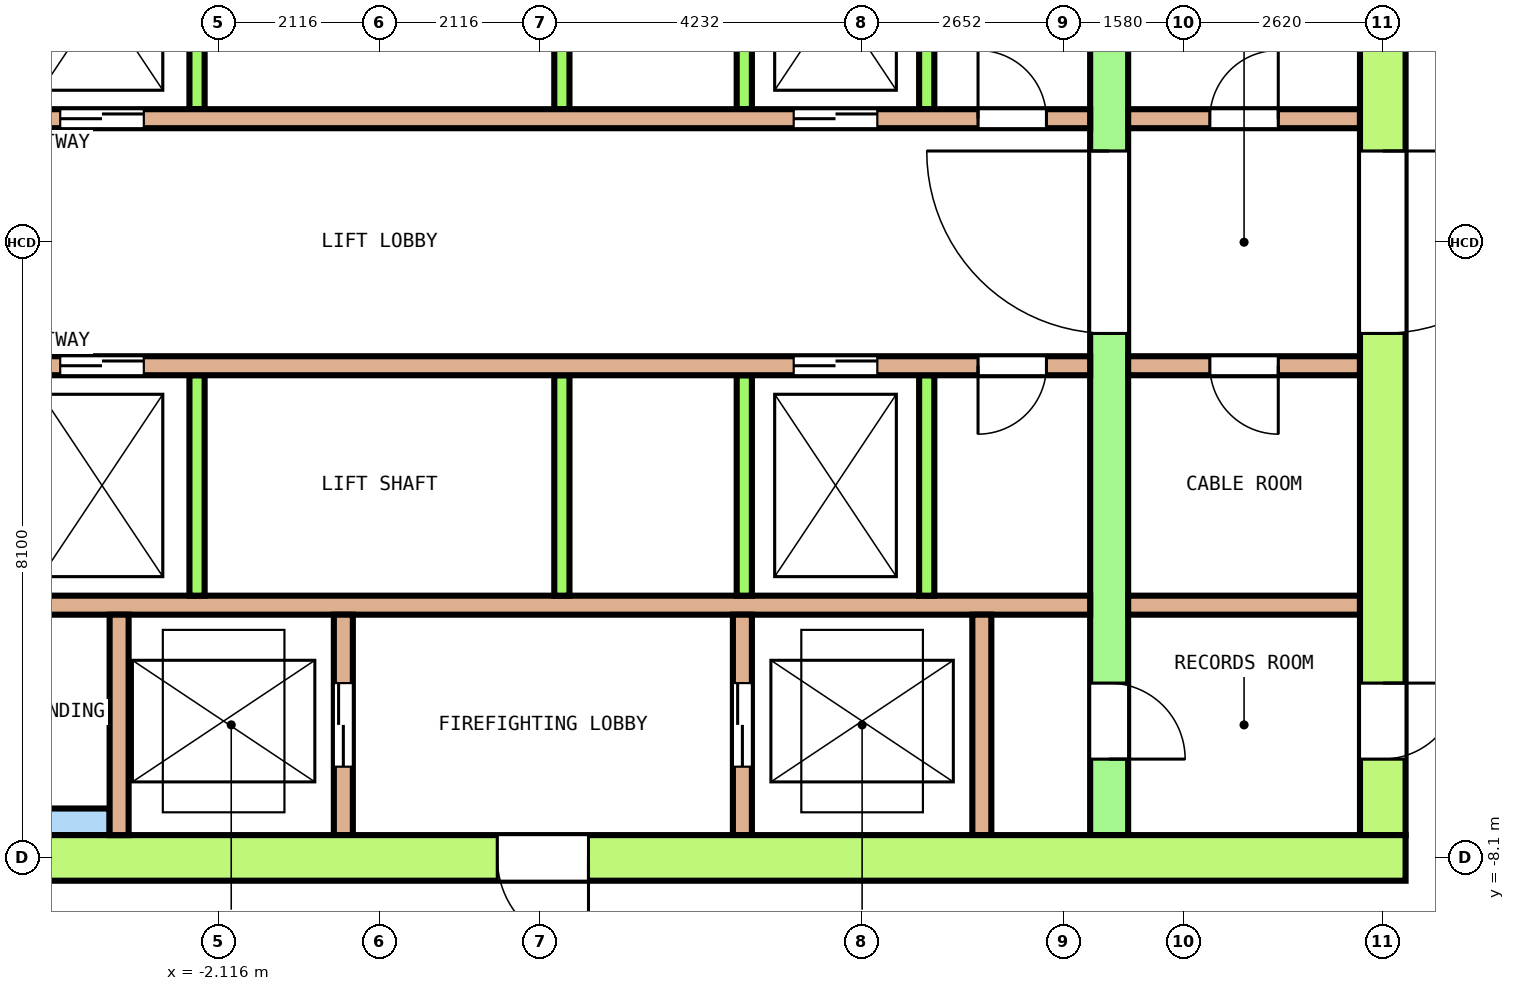
"""IFC4 building model, lengths in metres.
Left out: names, types, materials, properties, quantities, classifications, styles, units other than length and angle.
Written with IfcOpenShell. Run it as: python <this file> out.ifc"""

import sys

from ifc_helpers import new_model, si_unit, direction, frame, frame_2d, origin, place, context, subcontext, project, spatial, rectangle, extrude, element, fill, save


model = new_model("IFC4")
c1 = context("Model", 3, precision=1e-05, world=origin(), true_north=direction((0.0, 1.0)))
c2 = subcontext(c1, "Body", "Model", "MODEL_VIEW")
j1 = project(units=[si_unit("LENGTHUNIT", "METRE"), si_unit("PLANEANGLEUNIT", "RADIAN")], contexts=[c1])
p1 = place(None, origin())
s1 = spatial("IfcSite", under=j1, at=p1, CompositionType="ELEMENT")
p2 = place(p1, origin())
s2 = spatial("IfcBuilding", under=s1, at=p2, CompositionType="ELEMENT")
p3 = place(p2, frame((0.0, 0.0, 215.4)))
s3 = spatial("IfcBuildingStorey", under=s2, at=p3, CompositionType="ELEMENT", Elevation=215.4)
p4 = place(p3, frame((-13.5, -8.1, 0.0), z_axis=(0.0, 0.0, 1.0), x_axis=(1.0, 0.0, 0.0)))
e1 = element("IfcWall", 1, at=p4, inside=s3, PredefinedType="SHEAR", context=c2, shape_type="SweptSolid", body=[
    extrude(rectangle(XDim=27.0, YDim=0.6, at=frame_2d((13.5, 0.0))), origin(), (0.0, 0.0, 1.0), 3.7),
])
p5 = place(p4, frame((15.05, 0.0, 0.0)))
e2 = element("IfcOpeningElement", 2, at=p5, cuts=e1, PredefinedType="OPENING", context=c2, shape_type="SweptSolid", body=[
    extrude(rectangle(XDim=1.2, YDim=2.1, at=frame_2d((0.6, 1.05))), frame((0.0, 0.31, 0.0), z_axis=(0.0, -1.0, 0.0), x_axis=(1.0, 0.0, 0.0)), (0.0, 0.0, 1.0), 0.62),
])
p6 = place(p3, frame((13.2, -7.8, 0.0), z_axis=(0.0, 0.0, 1.0), x_axis=(0.0, 1.0, 0.0)))
e3 = element("IfcWall", 3, at=p6, inside=s3, PredefinedType="SHEAR", context=c2, shape_type="SweptSolid", body=[
    extrude(rectangle(XDim=15.6, YDim=0.6, at=frame_2d((7.8, 0.0))), origin(), (0.0, 0.0, 1.0), 3.7),
])
p7 = place(p6, frame((6.6, 0.0, 0.0)))
e4 = element("IfcOpeningElement", 4, at=p7, cuts=e3, PredefinedType="OPENING", context=c2, shape_type="SweptSolid", body=[
    extrude(rectangle(XDim=2.4, YDim=2.1, at=frame_2d((1.2, 1.05))), frame((0.0, 0.31, 0.0), z_axis=(0.0, -1.0, 0.0), x_axis=(1.0, 0.0, 0.0)), (0.0, 0.0, 1.0), 0.62),
])
p8 = place(p6, frame((13.5, 0.0, 0.0)))
e5 = element("IfcOpeningElement", 5, at=p8, cuts=e3, PredefinedType="OPENING", context=c2, shape_type="SweptSolid", body=[
    extrude(rectangle(XDim=1.2, YDim=2.1, at=frame_2d((0.6, 1.05))), frame((0.0, 0.31, 0.0), z_axis=(0.0, -1.0, 0.0), x_axis=(1.0, 0.0, 0.0)), (0.0, 0.0, 1.0), 0.62),
])
p9 = place(p6, frame((1.0, 0.0, 0.0)))
e6 = element("IfcOpeningElement", 6, at=p9, cuts=e3, PredefinedType="OPENING", context=c2, shape_type="SweptSolid", body=[
    extrude(rectangle(XDim=1.0, YDim=2.1, at=frame_2d((0.5, 1.05))), frame((0.0, 0.31, 0.0), z_axis=(0.0, -1.0, 0.0), x_axis=(1.0, 0.0, 0.0)), (0.0, 0.0, 1.0), 0.62),
])
p10 = place(p3, frame((9.6, -7.8, 0.0), z_axis=(0.0, 0.0, 1.0), x_axis=(0.0, 1.0, 0.0)))
e7 = element("IfcWall", 7, at=p10, inside=s3, PredefinedType="SHEAR", context=c2, shape_type="SweptSolid", body=[
    extrude(rectangle(XDim=15.6, YDim=0.5, at=frame_2d((7.8, 0.0))), origin(), (0.0, 0.0, 1.0), 3.7),
])
p11 = place(p10, frame((6.6, 0.0, 0.0)))
e8 = element("IfcOpeningElement", 8, at=p11, cuts=e7, PredefinedType="OPENING", context=c2, shape_type="SweptSolid", body=[
    extrude(rectangle(XDim=2.4, YDim=2.1, at=frame_2d((1.2, 1.05))), frame((0.0, 0.26, 0.0), z_axis=(0.0, -1.0, 0.0), x_axis=(1.0, 0.0, 0.0)), (0.0, 0.0, 1.0), 0.52),
])
p12 = place(p10, frame((13.5, 0.0, 0.0)))
e9 = element("IfcOpeningElement", 9, at=p12, cuts=e7, PredefinedType="OPENING", context=c2, shape_type="SweptSolid", body=[
    extrude(rectangle(XDim=1.2, YDim=2.1, at=frame_2d((0.6, 1.05))), frame((0.0, 0.26, 0.0), z_axis=(0.0, -1.0, 0.0), x_axis=(1.0, 0.0, 0.0)), (0.0, 0.0, 1.0), 0.52),
])
p13 = place(p10, frame((1.0, 0.0, 0.0)))
e10 = element("IfcOpeningElement", 10, at=p13, cuts=e7, PredefinedType="OPENING", context=c2, shape_type="SweptSolid", body=[
    extrude(rectangle(XDim=1.0, YDim=2.1, at=frame_2d((0.5, 1.05))), frame((0.0, 0.26, 0.0), z_axis=(0.0, -1.0, 0.0), x_axis=(1.0, 0.0, 0.0)), (0.0, 0.0, 1.0), 0.52),
])
p14 = place(p3, frame((-9.35, 1.625, 0.0), z_axis=(0.0, 0.0, 1.0), x_axis=(1.0, 0.0, 0.0)))
e11 = element("IfcWall", 11, at=p14, inside=s3, PredefinedType="SOLIDWALL", context=c2, shape_type="SweptSolid", body=[
    extrude(rectangle(XDim=18.7, YDim=0.25, at=frame_2d((9.35, 0.0))), origin(), (0.0, 0.0, 1.0), 3.7),
])
p15 = place(p14, frame((2.85, 0.0, 0.0)))
e12 = element("IfcOpeningElement", 12, at=p15, cuts=e11, PredefinedType="OPENING", context=c2, shape_type="SweptSolid", body=[
    extrude(rectangle(XDim=1.1, YDim=2.1, at=frame_2d((0.55, 1.05))), frame((0.0, 0.135, 0.0), z_axis=(0.0, -1.0, 0.0), x_axis=(1.0, 0.0, 0.0)), (0.0, 0.0, 1.0), 0.27),
])
p16 = place(p14, frame((5.15, 0.0, 0.0)))
e13 = element("IfcOpeningElement", 13, at=p16, cuts=e11, PredefinedType="OPENING", context=c2, shape_type="SweptSolid", body=[
    extrude(rectangle(XDim=1.1, YDim=2.1, at=frame_2d((0.55, 1.05))), frame((0.0, 0.135, 0.0), z_axis=(0.0, -1.0, 0.0), x_axis=(1.0, 0.0, 0.0)), (0.0, 0.0, 1.0), 0.27),
])
p17 = place(p14, frame((14.8, 0.0, 0.0)))
e14 = element("IfcOpeningElement", 14, at=p17, cuts=e11, PredefinedType="OPENING", context=c2, shape_type="SweptSolid", body=[
    extrude(rectangle(XDim=1.1, YDim=2.1, at=frame_2d((0.55, 1.05))), frame((0.0, 0.135, 0.0), z_axis=(0.0, -1.0, 0.0), x_axis=(1.0, 0.0, 0.0)), (0.0, 0.0, 1.0), 0.27),
])
p18 = place(p14, frame((0.575, 0.0, 0.0)))
e15 = element("IfcOpeningElement", 15, at=p18, cuts=e11, PredefinedType="OPENING", context=c2, shape_type="SweptSolid", body=[
    extrude(rectangle(XDim=0.9, YDim=2.1, at=frame_2d((0.45, 1.05))), frame((0.0, 0.135, 0.0), z_axis=(0.0, -1.0, 0.0), x_axis=(1.0, 0.0, 0.0)), (0.0, 0.0, 1.0), 0.27),
])
p19 = place(p14, frame((17.225, 0.0, 0.0)))
e16 = element("IfcOpeningElement", 16, at=p19, cuts=e11, PredefinedType="OPENING", context=c2, shape_type="SweptSolid", body=[
    extrude(rectangle(XDim=0.9, YDim=2.1, at=frame_2d((0.45, 1.05))), frame((0.0, 0.135, 0.0), z_axis=(0.0, -1.0, 0.0), x_axis=(1.0, 0.0, 0.0)), (0.0, 0.0, 1.0), 0.27),
])
p20 = place(p3, frame((9.85, 1.625, 0.0), z_axis=(0.0, 0.0, 1.0), x_axis=(1.0, 0.0, 0.0)))
e17 = element("IfcWall", 17, at=p20, inside=s3, PredefinedType="SOLIDWALL", context=c2, shape_type="SweptSolid", body=[
    extrude(rectangle(XDim=3.05, YDim=0.25, at=frame_2d((1.525, 0.0))), origin(), (0.0, 0.0, 1.0), 3.7),
])
p21 = place(p20, frame((1.075, 0.0, 0.0)))
e18 = element("IfcOpeningElement", 18, at=p21, cuts=e17, PredefinedType="OPENING", context=c2, shape_type="SweptSolid", body=[
    extrude(rectangle(XDim=0.9, YDim=2.1, at=frame_2d((0.45, 1.05))), frame((0.0, 0.135, 0.0), z_axis=(0.0, -1.0, 0.0), x_axis=(1.0, 0.0, 0.0)), (0.0, 0.0, 1.0), 0.27),
])
for number, where, z_axis, x_axis in (
    (19, (-2.4, 1.75, 0.0), (0.0, 0.0, 1.0), (0.0, 1.0, 0.0)),
    (20, (2.4, 1.75, 0.0), (0.0, 0.0, 1.0), (0.0, 1.0, 0.0)),
    (21, (4.8, 1.75, 0.0), (0.0, 0.0, 1.0), (0.0, 1.0, 0.0)),
    (22, (7.2, 1.75, 0.0), (0.0, 0.0, 1.0), (0.0, 1.0, 0.0)),
):
    element("IfcWall", number, at=place(p3, frame(where, z_axis=z_axis, x_axis=x_axis)), inside=s3, PredefinedType="SOLIDWALL", context=c2, shape_type="SweptSolid", body=[
        extrude(rectangle(XDim=2.9, YDim=0.2, at=frame_2d((1.45, 0.0))), origin(), (0.0, 0.0, 1.0), 3.7),
    ])
p22 = place(p3, frame((-9.35, -1.625, 0.0), z_axis=(0.0, 0.0, 1.0), x_axis=(1.0, 0.0, 0.0)))
e23 = element("IfcWall", 23, at=p22, inside=s3, PredefinedType="SOLIDWALL", context=c2, shape_type="SweptSolid", body=[
    extrude(rectangle(XDim=18.7, YDim=0.25, at=frame_2d((9.35, 0.0))), origin(), (0.0, 0.0, 1.0), 3.7),
])
p23 = place(p22, frame((2.85, 0.0, 0.0)))
e24 = element("IfcOpeningElement", 24, at=p23, cuts=e23, PredefinedType="OPENING", context=c2, shape_type="SweptSolid", body=[
    extrude(rectangle(XDim=1.1, YDim=2.1, at=frame_2d((0.55, 1.05))), frame((0.0, 0.135, 0.0), z_axis=(0.0, -1.0, 0.0), x_axis=(1.0, 0.0, 0.0)), (0.0, 0.0, 1.0), 0.27),
])
p24 = place(p22, frame((5.15, 0.0, 0.0)))
e25 = element("IfcOpeningElement", 25, at=p24, cuts=e23, PredefinedType="OPENING", context=c2, shape_type="SweptSolid", body=[
    extrude(rectangle(XDim=1.1, YDim=2.1, at=frame_2d((0.55, 1.05))), frame((0.0, 0.135, 0.0), z_axis=(0.0, -1.0, 0.0), x_axis=(1.0, 0.0, 0.0)), (0.0, 0.0, 1.0), 0.27),
])
p25 = place(p22, frame((14.8, 0.0, 0.0)))
e26 = element("IfcOpeningElement", 26, at=p25, cuts=e23, PredefinedType="OPENING", context=c2, shape_type="SweptSolid", body=[
    extrude(rectangle(XDim=1.1, YDim=2.1, at=frame_2d((0.55, 1.05))), frame((0.0, 0.135, 0.0), z_axis=(0.0, -1.0, 0.0), x_axis=(1.0, 0.0, 0.0)), (0.0, 0.0, 1.0), 0.27),
])
p26 = place(p22, frame((0.575, 0.0, 0.0)))
e27 = element("IfcOpeningElement", 27, at=p26, cuts=e23, PredefinedType="OPENING", context=c2, shape_type="SweptSolid", body=[
    extrude(rectangle(XDim=0.9, YDim=2.1, at=frame_2d((0.45, 1.05))), frame((0.0, 0.135, 0.0), z_axis=(0.0, -1.0, 0.0), x_axis=(1.0, 0.0, 0.0)), (0.0, 0.0, 1.0), 0.27),
])
p27 = place(p22, frame((17.225, 0.0, 0.0)))
e28 = element("IfcOpeningElement", 28, at=p27, cuts=e23, PredefinedType="OPENING", context=c2, shape_type="SweptSolid", body=[
    extrude(rectangle(XDim=0.9, YDim=2.1, at=frame_2d((0.45, 1.05))), frame((0.0, 0.135, 0.0), z_axis=(0.0, -1.0, 0.0), x_axis=(1.0, 0.0, 0.0)), (0.0, 0.0, 1.0), 0.27),
])
p28 = place(p3, frame((9.85, -1.625, 0.0), z_axis=(0.0, 0.0, 1.0), x_axis=(1.0, 0.0, 0.0)))
e29 = element("IfcWall", 29, at=p28, inside=s3, PredefinedType="SOLIDWALL", context=c2, shape_type="SweptSolid", body=[
    extrude(rectangle(XDim=3.05, YDim=0.25, at=frame_2d((1.525, 0.0))), origin(), (0.0, 0.0, 1.0), 3.7),
])
p29 = place(p28, frame((1.075, 0.0, 0.0)))
e30 = element("IfcOpeningElement", 30, at=p29, cuts=e29, PredefinedType="OPENING", context=c2, shape_type="SweptSolid", body=[
    extrude(rectangle(XDim=0.9, YDim=2.1, at=frame_2d((0.45, 1.05))), frame((0.0, 0.135, 0.0), z_axis=(0.0, -1.0, 0.0), x_axis=(1.0, 0.0, 0.0)), (0.0, 0.0, 1.0), 0.27),
])
p30 = place(p3, frame((-9.35, -4.775, 0.0), z_axis=(0.0, 0.0, 1.0), x_axis=(1.0, 0.0, 0.0)))
e31 = element("IfcWall", 31, at=p30, inside=s3, PredefinedType="SOLIDWALL", context=c2, shape_type="SweptSolid", body=[
    extrude(rectangle(XDim=18.7, YDim=0.25, at=frame_2d((9.35, 0.0))), origin(), (0.0, 0.0, 1.0), 3.7),
])
p31 = place(p3, frame((9.85, -4.775, 0.0), z_axis=(0.0, 0.0, 1.0), x_axis=(1.0, 0.0, 0.0)))
e32 = element("IfcWall", 32, at=p31, inside=s3, PredefinedType="SOLIDWALL", context=c2, shape_type="SweptSolid", body=[
    extrude(rectangle(XDim=3.05, YDim=0.25, at=frame_2d((1.525, 0.0))), origin(), (0.0, 0.0, 1.0), 3.7),
])
for number, where, z_axis, x_axis in (
    (33, (-2.4, -4.65, 0.0), (0.0, 0.0, 1.0), (0.0, 1.0, 0.0)),
    (34, (2.4, -4.65, 0.0), (0.0, 0.0, 1.0), (0.0, 1.0, 0.0)),
    (35, (4.8, -4.65, 0.0), (0.0, 0.0, 1.0), (0.0, 1.0, 0.0)),
    (36, (7.2, -4.65, 0.0), (0.0, 0.0, 1.0), (0.0, 1.0, 0.0)),
):
    element("IfcWall", number, at=place(p3, frame(where, z_axis=z_axis, x_axis=x_axis)), inside=s3, PredefinedType="SOLIDWALL", context=c2, shape_type="SweptSolid", body=[
        extrude(rectangle(XDim=2.9, YDim=0.2, at=frame_2d((1.45, 0.0))), origin(), (0.0, 0.0, 1.0), 3.7),
    ])
p32 = place(p3, frame((-9.35, -7.625, 0.0), z_axis=(0.0, 0.0, 1.0), x_axis=(1.0, 0.0, 0.0)))
e37 = element("IfcWall", 37, at=p32, inside=s3, PredefinedType="SOLIDWALL", context=c2, shape_type="SweptSolid", body=[
    extrude(rectangle(XDim=5.8, YDim=0.35, at=frame_2d((2.9, 0.0))), origin(), (0.0, 0.0, 1.0), 3.7),
])
p33 = place(p3, frame((-3.425, -7.8, 0.0), z_axis=(0.0, 0.0, 1.0), x_axis=(0.0, 1.0, 0.0)))
e38 = element("IfcWall", 38, at=p33, inside=s3, PredefinedType="SOLIDWALL", context=c2, shape_type="SweptSolid", body=[
    extrude(rectangle(XDim=2.9, YDim=0.25, at=frame_2d((1.45, 0.0))), origin(), (0.0, 0.0, 1.0), 3.7),
])
p34 = place(p3, frame((-0.475, -7.8, 0.0), z_axis=(0.0, 0.0, 1.0), x_axis=(0.0, 1.0, 0.0)))
e39 = element("IfcWall", 39, at=p34, inside=s3, PredefinedType="SOLIDWALL", context=c2, shape_type="SweptSolid", body=[
    extrude(rectangle(XDim=2.9, YDim=0.25, at=frame_2d((1.45, 0.0))), origin(), (0.0, 0.0, 1.0), 3.7),
])
p35 = place(p34, frame((0.9, 0.0, 0.0)))
e40 = element("IfcOpeningElement", 40, at=p35, cuts=e39, PredefinedType="OPENING", context=c2, shape_type="SweptSolid", body=[
    extrude(rectangle(XDim=1.1, YDim=2.1, at=frame_2d((0.55, 1.05))), frame((0.0, 0.135, 0.0), z_axis=(0.0, -1.0, 0.0), x_axis=(1.0, 0.0, 0.0)), (0.0, 0.0, 1.0), 0.27),
])
p36 = place(p3, frame((4.775, -7.8, 0.0), z_axis=(0.0, 0.0, 1.0), x_axis=(0.0, 1.0, 0.0)))
e41 = element("IfcWall", 41, at=p36, inside=s3, PredefinedType="SOLIDWALL", context=c2, shape_type="SweptSolid", body=[
    extrude(rectangle(XDim=2.9, YDim=0.25, at=frame_2d((1.45, 0.0))), origin(), (0.0, 0.0, 1.0), 3.7),
])
p37 = place(p36, frame((0.9, 0.0, 0.0)))
e42 = element("IfcOpeningElement", 42, at=p37, cuts=e41, PredefinedType="OPENING", context=c2, shape_type="SweptSolid", body=[
    extrude(rectangle(XDim=1.1, YDim=2.1, at=frame_2d((0.55, 1.05))), frame((0.0, 0.135, 0.0), z_axis=(0.0, -1.0, 0.0), x_axis=(1.0, 0.0, 0.0)), (0.0, 0.0, 1.0), 0.27),
])
p38 = place(p3, frame((7.925, -7.8, 0.0), z_axis=(0.0, 0.0, 1.0), x_axis=(0.0, 1.0, 0.0)))
e43 = element("IfcWall", 43, at=p38, inside=s3, PredefinedType="SOLIDWALL", context=c2, shape_type="SweptSolid", body=[
    extrude(rectangle(XDim=2.9, YDim=0.25, at=frame_2d((1.45, 0.0))), origin(), (0.0, 0.0, 1.0), 3.7),
])
p39 = place(p16, origin())
e44 = element("IfcDoor", 44, at=p39, inside=s3, OperationType="DOUBLE_DOOR_SLIDING", PredefinedType="DOOR", context=c2, shape_type="SweptSolid", body=[
    extrude(rectangle(XDim=1.1, YDim=2.1, at=frame_2d((0.55, 1.05))), frame((0.0, 0.075, 0.0), z_axis=(0.0, -1.0, 0.0), x_axis=(1.0, 0.0, 0.0)), (0.0, 0.0, 1.0), 0.15),
])
fill(e13, e44)
p40 = place(p17, origin())
e45 = element("IfcDoor", 45, at=p40, inside=s3, OperationType="DOUBLE_DOOR_SLIDING", PredefinedType="DOOR", context=c2, shape_type="SweptSolid", body=[
    extrude(rectangle(XDim=1.1, YDim=2.1, at=frame_2d((0.55, 1.05))), frame((0.0, 0.075, 0.0), z_axis=(0.0, -1.0, 0.0), x_axis=(1.0, 0.0, 0.0)), (0.0, 0.0, 1.0), 0.15),
])
fill(e14, e45)
p41 = place(p24, origin())
e46 = element("IfcDoor", 46, at=p41, inside=s3, OperationType="DOUBLE_DOOR_SLIDING", PredefinedType="DOOR", context=c2, shape_type="SweptSolid", body=[
    extrude(rectangle(XDim=1.1, YDim=2.1, at=frame_2d((0.55, 1.05))), frame((0.0, 0.075, 0.0), z_axis=(0.0, -1.0, 0.0), x_axis=(1.0, 0.0, 0.0)), (0.0, 0.0, 1.0), 0.15),
])
fill(e25, e46)
p42 = place(p25, origin())
e47 = element("IfcDoor", 47, at=p42, inside=s3, OperationType="DOUBLE_DOOR_SLIDING", PredefinedType="DOOR", context=c2, shape_type="SweptSolid", body=[
    extrude(rectangle(XDim=1.1, YDim=2.1, at=frame_2d((0.55, 1.05))), frame((0.0, 0.075, 0.0), z_axis=(0.0, -1.0, 0.0), x_axis=(1.0, 0.0, 0.0)), (0.0, 0.0, 1.0), 0.15),
])
fill(e26, e47)
p43 = place(p35, origin())
e48 = element("IfcDoor", 48, at=p43, inside=s3, OperationType="DOUBLE_DOOR_SLIDING", PredefinedType="DOOR", context=c2, shape_type="SweptSolid", body=[
    extrude(rectangle(XDim=1.1, YDim=2.1, at=frame_2d((0.55, 1.05))), frame((0.0, 0.075, 0.0), z_axis=(0.0, -1.0, 0.0), x_axis=(1.0, 0.0, 0.0)), (0.0, 0.0, 1.0), 0.15),
])
fill(e40, e48)
p44 = place(p37, origin())
e49 = element("IfcDoor", 49, at=p44, inside=s3, OperationType="DOUBLE_DOOR_SLIDING", PredefinedType="DOOR", context=c2, shape_type="SweptSolid", body=[
    extrude(rectangle(XDim=1.1, YDim=2.1, at=frame_2d((0.55, 1.05))), frame((0.0, 0.075, 0.0), z_axis=(0.0, -1.0, 0.0), x_axis=(1.0, 0.0, 0.0)), (0.0, 0.0, 1.0), 0.15),
])
fill(e42, e49)
p45 = place(p11, origin())
e50 = element("IfcDoor", 50, at=p45, inside=s3, OperationType="DOUBLE_DOOR_SINGLE_SWING", PredefinedType="DOOR", context=c2, shape_type="SweptSolid", body=[
    extrude(rectangle(XDim=2.4, YDim=2.1, at=frame_2d((1.2, 1.05))), frame((0.0, 0.2, 0.0), z_axis=(0.0, -1.0, 0.0), x_axis=(1.0, 0.0, 0.0)), (0.0, 0.0, 1.0), 0.4),
])
fill(e8, e50)
p46 = place(p7, origin())
e51 = element("IfcDoor", 51, at=p46, inside=s3, OperationType="DOUBLE_DOOR_SINGLE_SWING", PredefinedType="DOOR", context=c2, shape_type="SweptSolid", body=[
    extrude(rectangle(XDim=2.4, YDim=2.1, at=frame_2d((1.2, 1.05))), frame((0.0, 0.25, 0.0), z_axis=(0.0, -1.0, 0.0), x_axis=(1.0, 0.0, 0.0)), (0.0, 0.0, 1.0), 0.5),
])
fill(e4, e51)
p47 = place(p5, origin())
e52 = element("IfcDoor", 52, at=p47, inside=s3, OperationType="SINGLE_SWING_RIGHT", PredefinedType="DOOR", context=c2, shape_type="SweptSolid", body=[
    extrude(rectangle(XDim=1.2, YDim=2.1, at=frame_2d((0.6, 1.05))), frame((0.0, 0.25, 0.0), z_axis=(0.0, -1.0, 0.0), x_axis=(1.0, 0.0, 0.0)), (0.0, 0.0, 1.0), 0.5),
])
fill(e2, e52)
p48 = place(p13, origin())
e53 = element("IfcDoor", 53, at=p48, inside=s3, OperationType="SINGLE_SWING_RIGHT", PredefinedType="DOOR", context=c2, shape_type="SweptSolid", body=[
    extrude(rectangle(XDim=1.0, YDim=2.1, at=frame_2d((0.5, 1.05))), frame((0.0, 0.2, 0.0), z_axis=(0.0, -1.0, 0.0), x_axis=(1.0, 0.0, 0.0)), (0.0, 0.0, 1.0), 0.4),
])
fill(e10, e53)
p49 = place(p9, origin())
e54 = element("IfcDoor", 54, at=p49, inside=s3, OperationType="SINGLE_SWING_LEFT", PredefinedType="DOOR", context=c2, shape_type="SweptSolid", body=[
    extrude(rectangle(XDim=1.0, YDim=2.1, at=frame_2d((0.5, 1.05))), frame((0.0, 0.25, 0.0), z_axis=(0.0, -1.0, 0.0), x_axis=(1.0, 0.0, 0.0)), (0.0, 0.0, 1.0), 0.5),
])
fill(e6, e54)
p50 = place(p19, origin())
e55 = element("IfcDoor", 55, at=p50, inside=s3, OperationType="SINGLE_SWING_RIGHT", PredefinedType="DOOR", context=c2, shape_type="SweptSolid", body=[
    extrude(rectangle(XDim=0.9, YDim=2.1, at=frame_2d((0.45, 1.05))), frame((0.0, 0.075, 0.0), z_axis=(0.0, -1.0, 0.0), x_axis=(1.0, 0.0, 0.0)), (0.0, 0.0, 1.0), 0.15),
])
fill(e16, e55)
p51 = place(p21, origin())
e56 = element("IfcDoor", 56, at=p51, inside=s3, OperationType="SINGLE_SWING_LEFT", PredefinedType="DOOR", context=c2, shape_type="SweptSolid", body=[
    extrude(rectangle(XDim=0.9, YDim=2.1, at=frame_2d((0.45, 1.05))), frame((0.0, 0.075, 0.0), z_axis=(0.0, -1.0, 0.0), x_axis=(1.0, 0.0, 0.0)), (0.0, 0.0, 1.0), 0.15),
])
fill(e18, e56)
p52 = place(p27, origin())
e57 = element("IfcDoor", 57, at=p52, inside=s3, OperationType="SINGLE_SWING_RIGHT", PredefinedType="DOOR", context=c2, shape_type="SweptSolid", body=[
    extrude(rectangle(XDim=0.9, YDim=2.1, at=frame_2d((0.45, 1.05))), frame((0.0, 0.075, 0.0), z_axis=(0.0, -1.0, 0.0), x_axis=(1.0, 0.0, 0.0)), (0.0, 0.0, 1.0), 0.15),
])
fill(e28, e57)
p53 = place(p29, origin())
e58 = element("IfcDoor", 58, at=p53, inside=s3, OperationType="SINGLE_SWING_LEFT", PredefinedType="DOOR", context=c2, shape_type="SweptSolid", body=[
    extrude(rectangle(XDim=0.9, YDim=2.1, at=frame_2d((0.45, 1.05))), frame((0.0, 0.075, 0.0), z_axis=(0.0, -1.0, 0.0), x_axis=(1.0, 0.0, 0.0)), (0.0, 0.0, 1.0), 0.15),
])
fill(e30, e58)
save(model, sys.argv[1])
